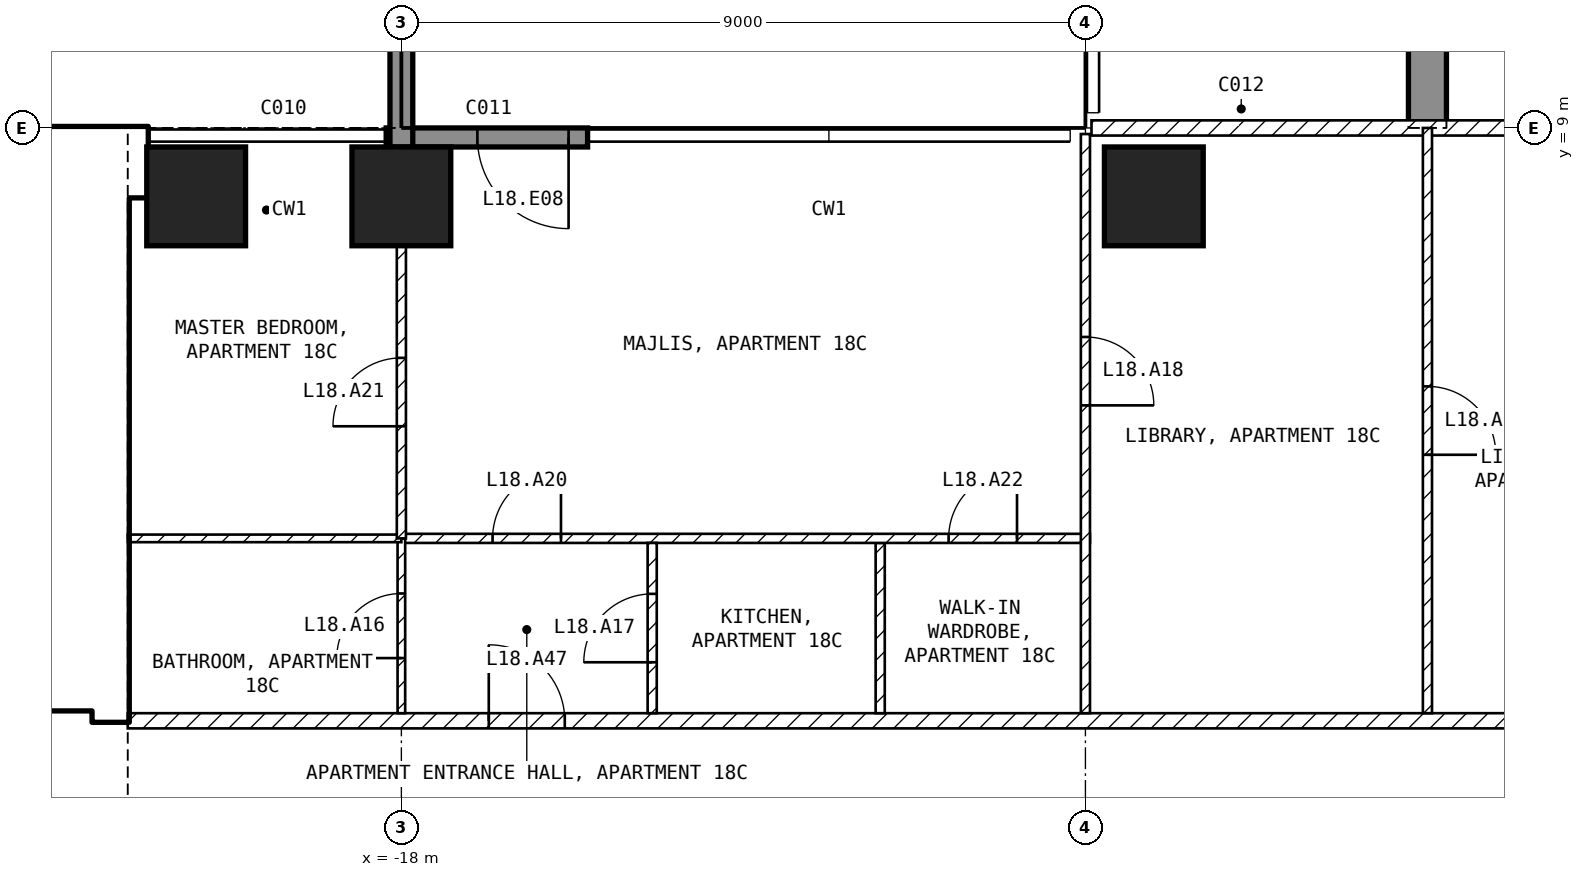
"""IFC4 building model, lengths in metres.
Left out: names, types, materials, properties, quantities, classifications, styles, units other than length and angle.
Written with IfcOpenShell. Run it as: python <this file> out.ifc"""

import sys

from ifc_helpers import new_model, si_unit, direction, frame, frame_2d, origin, origin_2d, place, context, subcontext, project, spatial, polyline, rectangle, outline, extrude, element, fill, save


model = new_model("IFC4")
c1 = context("Model", 3, precision=1e-05, world=origin(), true_north=direction((0.0, 1.0)))
c2 = subcontext(c1, "Body", "Model", "MODEL_VIEW")
j1 = project(units=[si_unit("LENGTHUNIT", "METRE"), si_unit("PLANEANGLEUNIT", "RADIAN")], contexts=[c1])
p1 = place(None, origin())
s1 = spatial("IfcSite", under=j1, at=p1, CompositionType="ELEMENT")
p2 = place(p1, origin())
s2 = spatial("IfcBuilding", under=s1, at=p2, CompositionType="ELEMENT")
p3 = place(p2, frame((0.0, 0.0, 82.0)))
s3 = spatial("IfcBuildingStorey", under=s2, at=p3, CompositionType="ELEMENT", Elevation=82.0)
for number, where, z_axis, x_axis in (
    (1, (-20.7, 8.1, -0.25), (0.0, 0.0, 1.0), (1.0, 0.0, 0.0)),
    (2, (-18.0, 8.1, -0.25), (0.0, 0.0, 1.0), (1.0, 0.0, 0.0)),
    (3, (-8.1, 8.1, -0.25), (0.0, 0.0, 1.0), (1.0, 0.0, 0.0)),
):
    element("IfcColumn", number, at=place(p3, frame(where, z_axis=z_axis, x_axis=x_axis)), inside=s3, PredefinedType="COLUMN", context=c2, shape_type="SweptSolid", body=[
        extrude(rectangle(XDim=1.3, YDim=1.3, at=origin_2d()), origin(), (0.0, 0.0, 1.0), 3.5),
    ])
p4 = place(p3, frame((-4.75, 9.0, -0.25), z_axis=(1.0, 0.0, 0.0), x_axis=(0.0, 1.0, 0.0)))
e4 = element("IfcWall", 4, at=p4, inside=s3, PredefinedType="SHEAR", context=c2, shape_type="SweptSolid", body=[
    extrude(outline(polyline([(0.0, 0.0), (2.1, 0.0), (2.1, 2.65), (4.5, 2.65), (4.5, 0.0), (9.9, 0.0), (9.9, 2.65), (12.3, 2.65), (12.3, 0.0), (16.45, 0.0), (16.45, 3.5), (0.0, 3.5), (0.0, 0.0)])), origin(), (0.0, 0.0, 1.0), 0.5),
])
p5 = place(p3, frame((-15.55, 8.875, 0.0), z_axis=(0.0, 0.0, 1.0), x_axis=(-1.0, 0.0, 0.0)))
e5 = element("IfcWall", 5, at=p5, inside=s3, PredefinedType="SOLIDWALL", context=c2, shape_type="SweptSolid", body=[
    extrude(rectangle(XDim=2.65, YDim=0.25, at=frame_2d((1.325, 0.0))), origin(), (0.0, 0.0, 1.0), 3.25),
])
p6 = place(p5, frame((0.25, 0.0, 0.0)))
e6 = element("IfcOpeningElement", 6, at=p6, cuts=e5, PredefinedType="OPENING", context=c2, shape_type="SweptSolid", body=[
    extrude(rectangle(XDim=1.2, YDim=2.4, at=frame_2d((0.6, 1.2))), frame((0.0, 0.135, 0.0), z_axis=(0.0, -1.0, 0.0), x_axis=(1.0, 0.0, 0.0)), (0.0, 0.0, 1.0), 0.27),
])
p7 = place(p3, frame((-18.0, 8.75, 0.0), z_axis=(0.0, 0.0, 1.0), x_axis=(0.0, 1.0, 0.0)))
e7 = element("IfcWall", 7, at=p7, inside=s3, PredefinedType="SOLIDWALL", context=c2, shape_type="SweptSolid", body=[
    extrude(rectangle(XDim=2.95, YDim=0.3, at=frame_2d((1.475, 0.0))), origin(), (0.0, 0.0, 1.0), 3.25),
])
p8 = place(p3, frame((-31.5, 8.55, 0.0), z_axis=(0.0, 0.0, 1.0), x_axis=(1.0, 0.0, 0.0)))
e8 = element("IfcWall", 8, at=p8, inside=s3, PredefinedType="SHEAR", context=c2, shape_type="SweptSolid", body=[
    extrude(rectangle(XDim=10.15, YDim=0.9, at=frame_2d((5.075, 0.0))), origin(), (0.0, 0.0, 1.0), 3.25),
])
p9 = place(p3, frame((-21.825, 1.2, 0.0), z_axis=(0.0, 0.0, 1.0), x_axis=(0.0, 1.0, 0.0)))
e9 = element("IfcWall", 9, at=p9, inside=s3, PredefinedType="SHEAR", context=c2, shape_type="SweptSolid", body=[
    extrude(rectangle(XDim=6.9, YDim=0.45, at=frame_2d((3.45, 0.0))), origin(), (0.0, 0.0, 1.0), 3.25),
])
p10 = place(p3, frame((-35.1, 1.45, 0.0), z_axis=(0.0, 0.0, 1.0), x_axis=(1.0, 0.0, 0.0)))
e10 = element("IfcWall", 10, at=p10, inside=s3, PredefinedType="SOLIDWALL", context=c2, shape_type="SweptSolid", body=[
    extrude(rectangle(XDim=13.05, YDim=0.2, at=frame_2d((6.525, 0.0))), origin(), (0.0, 0.0, 1.0), 3.25),
])
p11 = place(p10, frame((11.3, 0.0, 0.0)))
e11 = element("IfcOpeningElement", 11, at=p11, cuts=e10, PredefinedType="OPENING", context=c2, shape_type="SweptSolid", body=[
    extrude(rectangle(XDim=1.0, YDim=2.1, at=frame_2d((0.5, 1.05))), frame((0.0, 0.11, 0.0), z_axis=(0.0, -1.0, 0.0), x_axis=(1.0, 0.0, 0.0)), (0.0, 0.0, 1.0), 0.22),
])
p12 = place(p10, frame((8.8, 0.0, 0.0)))
e12 = element("IfcOpeningElement", 12, at=p12, cuts=e10, PredefinedType="OPENING", context=c2, shape_type="SweptSolid", body=[
    extrude(rectangle(XDim=1.0, YDim=2.1, at=frame_2d((0.5, 1.05))), frame((0.0, 0.11, 0.0), z_axis=(0.0, -1.0, 0.0), x_axis=(1.0, 0.0, 0.0)), (0.0, 0.0, 1.0), 0.22),
])
p13 = place(p3, frame((-28.35, 5.15, 0.0), z_axis=(0.0, 0.0, 1.0), x_axis=(1.0, 0.0, 0.0)))
e13 = element("IfcWall", 13, at=p13, inside=s3, PredefinedType="SOLIDWALL", context=c2, shape_type="SweptSolid", body=[
    extrude(rectangle(XDim=6.3, YDim=0.2, at=frame_2d((3.15, 0.0))), origin(), (0.0, 0.0, 1.0), 3.25),
])
p14 = place(p13, frame((5.1, 0.0, 0.0)))
e14 = element("IfcOpeningElement", 14, at=p14, cuts=e13, PredefinedType="OPENING", context=c2, shape_type="SweptSolid", body=[
    extrude(rectangle(XDim=1.0, YDim=2.1, at=frame_2d((0.5, 1.05))), frame((0.0, 0.11, 0.0), z_axis=(0.0, -1.0, 0.0), x_axis=(1.0, 0.0, 0.0)), (0.0, 0.0, 1.0), 0.22),
])
p15 = place(p3, frame((-21.6, 1.2, 0.0), z_axis=(0.0, 0.0, 1.0), x_axis=(1.0, 0.0, 0.0)))
e15 = element("IfcWall", 15, at=p15, inside=s3, PredefinedType="PARTITIONING", context=c2, shape_type="SweptSolid", body=[
    extrude(rectangle(XDim=20.5, YDim=0.2, at=frame_2d((10.25, 0.0))), origin(), (0.0, 0.0, 1.0), 3.25),
])
p16 = place(p15, frame((4.75, 0.0, 0.0)))
e16 = element("IfcOpeningElement", 16, at=p16, cuts=e15, PredefinedType="OPENING", context=c2, shape_type="SweptSolid", body=[
    extrude(rectangle(XDim=1.0, YDim=2.1, at=frame_2d((0.5, 1.05))), frame((0.0, 0.11, 0.0), z_axis=(0.0, -1.0, 0.0), x_axis=(1.0, 0.0, 0.0)), (0.0, 0.0, 1.0), 0.22),
])
p17 = place(p3, frame((-8.92, 9.0, 0.0), z_axis=(0.0, 0.0, 1.0), x_axis=(1.0, 0.0, 0.0)))
e17 = element("IfcWall", 17, at=p17, inside=s3, PredefinedType="PARTITIONING", context=c2, shape_type="SweptSolid", body=[
    extrude(rectangle(XDim=17.84, YDim=0.2, at=frame_2d((8.92, 0.0))), origin(), (0.0, 0.0, 1.0), 3.25),
])
p18 = place(p17, frame((8.42, 0.0, 0.0)))
e18 = element("IfcOpeningElement", 18, at=p18, cuts=e17, PredefinedType="OPENING", context=c2, shape_type="SweptSolid", body=[
    extrude(rectangle(XDim=1.0, YDim=2.1, at=frame_2d((0.5, 1.05))), frame((0.0, 0.11, 0.0), z_axis=(0.0, -1.0, 0.0), x_axis=(1.0, 0.0, 0.0)), (0.0, 0.0, 1.0), 0.22),
])
p19 = place(p3, frame((-11.7, 1.3, 0.0), z_axis=(0.0, 0.0, 1.0), x_axis=(0.0, 1.0, 0.0)))
e19 = element("IfcWall", 19, at=p19, inside=s3, PredefinedType="PARTITIONING", context=c2, shape_type="SweptSolid", body=[
    extrude(rectangle(XDim=2.24, YDim=0.12, at=frame_2d((1.12, 0.0))), origin(), (0.0, 0.0, 1.0), 3.25),
])
p20 = place(p3, frame((-18.0, 3.6, 0.0), z_axis=(0.0, 0.0, 1.0), x_axis=(1.0, 0.0, 0.0)))
e20 = element("IfcWall", 20, at=p20, inside=s3, PredefinedType="PARTITIONING", context=c2, shape_type="SweptSolid", body=[
    extrude(rectangle(XDim=9.06, YDim=0.12, at=frame_2d((4.53, 0.0))), origin(), (0.0, 0.0, 1.0), 3.25),
])
p21 = place(p20, frame((1.2, 0.0, 0.0)))
e21 = element("IfcOpeningElement", 21, at=p21, cuts=e20, PredefinedType="OPENING", context=c2, shape_type="SweptSolid", body=[
    extrude(rectangle(XDim=0.9, YDim=2.1, at=frame_2d((0.45, 1.05))), frame((0.0, 0.07, 0.0), z_axis=(0.0, -1.0, 0.0), x_axis=(1.0, 0.0, 0.0)), (0.0, 0.0, 1.0), 0.14),
])
p22 = place(p20, frame((7.2, 0.0, 0.0)))
e22 = element("IfcOpeningElement", 22, at=p22, cuts=e20, PredefinedType="OPENING", context=c2, shape_type="SweptSolid", body=[
    extrude(rectangle(XDim=0.9, YDim=2.1, at=frame_2d((0.45, 1.05))), frame((0.0, 0.07, 0.0), z_axis=(0.0, -1.0, 0.0), x_axis=(1.0, 0.0, 0.0)), (0.0, 0.0, 1.0), 0.14),
])
p23 = place(p3, frame((-9.0, 8.92, 0.0), z_axis=(0.0, 0.0, 1.0), x_axis=(0.0, -1.0, 0.0)))
e23 = element("IfcWall", 23, at=p23, inside=s3, PredefinedType="PARTITIONING", context=c2, shape_type="SweptSolid", body=[
    extrude(rectangle(XDim=7.62, YDim=0.12, at=frame_2d((3.81, 0.0))), origin(), (0.0, 0.0, 1.0), 3.25),
])
p24 = place(p23, frame((2.67, 0.0, 0.0)))
e24 = element("IfcOpeningElement", 24, at=p24, cuts=e23, PredefinedType="OPENING", context=c2, shape_type="SweptSolid", body=[
    extrude(rectangle(XDim=0.9, YDim=2.1, at=frame_2d((0.45, 1.05))), frame((0.0, 0.07, 0.0), z_axis=(0.0, -1.0, 0.0), x_axis=(1.0, 0.0, 0.0)), (0.0, 0.0, 1.0), 0.14),
])
p25 = place(p3, frame((-14.7, 1.3, 0.0), z_axis=(0.0, 0.0, 1.0), x_axis=(0.0, 1.0, 0.0)))
e25 = element("IfcWall", 25, at=p25, inside=s3, PredefinedType="PARTITIONING", context=c2, shape_type="SweptSolid", body=[
    extrude(rectangle(XDim=2.24, YDim=0.12, at=frame_2d((1.12, 0.0))), origin(), (0.0, 0.0, 1.0), 3.25),
])
p26 = place(p25, frame((0.67, 0.0, 0.0)))
e26 = element("IfcOpeningElement", 26, at=p26, cuts=e25, PredefinedType="OPENING", context=c2, shape_type="SweptSolid", body=[
    extrude(rectangle(XDim=0.9, YDim=2.1, at=frame_2d((0.45, 1.05))), frame((0.0, 0.07, 0.0), z_axis=(0.0, -1.0, 0.0), x_axis=(1.0, 0.0, 0.0)), (0.0, 0.0, 1.0), 0.14),
])
p27 = place(p3, frame((-18.0, 1.3, 0.0), z_axis=(0.0, 0.0, 1.0), x_axis=(0.0, 1.0, 0.0)))
e27 = element("IfcWall", 27, at=p27, inside=s3, PredefinedType="PARTITIONING", context=c2, shape_type="SweptSolid", body=[
    extrude(rectangle(XDim=2.3, YDim=0.1, at=frame_2d((1.15, 0.0))), origin(), (0.0, 0.0, 1.0), 2.346),
])
p28 = place(p27, frame((0.725, 0.0, 0.0)))
e28 = element("IfcOpeningElement", 28, at=p28, cuts=e27, PredefinedType="OPENING", context=c2, shape_type="SweptSolid", body=[
    extrude(rectangle(XDim=0.85, YDim=2.1, at=frame_2d((0.425, 1.05))), frame((0.0, 0.06, 0.0), z_axis=(0.0, -1.0, 0.0), x_axis=(1.0, 0.0, 0.0)), (0.0, 0.0, 1.0), 0.12),
])
p29 = place(p3, frame((-21.6, 3.6, 0.0), z_axis=(0.0, 0.0, 1.0), x_axis=(1.0, 0.0, 0.0)))
e29 = element("IfcWall", 29, at=p29, inside=s3, PredefinedType="PARTITIONING", context=c2, shape_type="SweptSolid", body=[
    extrude(rectangle(XDim=3.6, YDim=0.1, at=frame_2d((1.8, 0.0))), origin(), (0.0, 0.0, 1.0), 3.25),
])
p30 = place(p3, frame((-18.0, 3.6, 0.0), z_axis=(0.0, 0.0, 1.0), x_axis=(0.0, 1.0, 0.0)))
e30 = element("IfcWall", 30, at=p30, inside=s3, PredefinedType="PARTITIONING", context=c2, shape_type="SweptSolid", body=[
    extrude(rectangle(XDim=3.85, YDim=0.12, at=frame_2d((1.925, 0.0))), origin(), (0.0, 0.0, 1.0), 2.346),
])
p31 = place(p30, frame((1.475, 0.0, 0.0)))
e31 = element("IfcOpeningElement", 31, at=p31, cuts=e30, PredefinedType="OPENING", context=c2, shape_type="SweptSolid", body=[
    extrude(rectangle(XDim=0.9, YDim=2.1, at=frame_2d((0.45, 1.05))), frame((0.0, 0.07, 0.0), z_axis=(0.0, -1.0, 0.0), x_axis=(1.0, 0.0, 0.0)), (0.0, 0.0, 1.0), 0.14),
])
p32 = place(p3, frame((-4.5, 9.0, 0.0), z_axis=(0.0, 0.0, 1.0), x_axis=(0.0, -1.0, 0.0)))
e32 = element("IfcWall", 32, at=p32, inside=s3, PredefinedType="PARTITIONING", context=c2, shape_type="SweptSolid", body=[
    extrude(rectangle(XDim=7.7, YDim=0.12, at=frame_2d((3.85, 0.0))), origin(), (0.0, 0.0, 1.0), 3.25),
])
p33 = place(p32, frame((3.4, 0.0, 0.0)))
e33 = element("IfcOpeningElement", 33, at=p33, cuts=e32, PredefinedType="OPENING", context=c2, shape_type="SweptSolid", body=[
    extrude(rectangle(XDim=0.9, YDim=2.1, at=frame_2d((0.45, 1.05))), frame((0.0, 0.07, 0.0), z_axis=(0.0, -1.0, 0.0), x_axis=(1.0, 0.0, 0.0)), (0.0, 0.0, 1.0), 0.14),
])
p34 = place(p6, origin())
e34 = element("IfcDoor", 34, at=p34, inside=s3, OperationType="SINGLE_SWING_LEFT", PredefinedType="DOOR", context=c2, shape_type="SweptSolid", body=[
    extrude(rectangle(XDim=1.2, YDim=2.4, at=frame_2d((0.6, 1.2))), frame((0.0, 0.025, 0.0), z_axis=(0.0, -1.0, 0.0), x_axis=(1.0, 0.0, 0.0)), (0.0, 0.0, 1.0), 0.05),
])
fill(e6, e34)
p35 = place(p14, origin())
e35 = element("IfcDoor", 35, at=p35, inside=s3, OperationType="SINGLE_SWING_LEFT", PredefinedType="DOOR", context=c2, shape_type="SweptSolid", body=[
    extrude(rectangle(XDim=1.0, YDim=2.1, at=frame_2d((0.5, 1.05))), frame((0.0, 0.025, 0.0), z_axis=(0.0, -1.0, 0.0), x_axis=(1.0, 0.0, 0.0)), (0.0, 0.0, 1.0), 0.05),
])
fill(e14, e35)
p36 = place(p28, origin())
e36 = element("IfcDoor", 36, at=p36, inside=s3, OperationType="SINGLE_SWING_LEFT", PredefinedType="DOOR", context=c2, shape_type="SweptSolid", body=[
    extrude(rectangle(XDim=0.85, YDim=2.1, at=frame_2d((0.425, 1.05))), frame((0.0, 0.025, 0.0), z_axis=(0.0, -1.0, 0.0), x_axis=(1.0, 0.0, 0.0)), (0.0, 0.0, 1.0), 0.05),
])
fill(e28, e36)
p37 = place(p26, origin())
e37 = element("IfcDoor", 37, at=p37, inside=s3, OperationType="SINGLE_SWING_LEFT", PredefinedType="DOOR", context=c2, shape_type="SweptSolid", body=[
    extrude(rectangle(XDim=0.9, YDim=2.1, at=frame_2d((0.45, 1.05))), frame((0.0, 0.025, 0.0), z_axis=(0.0, -1.0, 0.0), x_axis=(1.0, 0.0, 0.0)), (0.0, 0.0, 1.0), 0.05),
])
fill(e26, e37)
p38 = place(p24, origin())
e38 = element("IfcDoor", 38, at=p38, inside=s3, OperationType="SINGLE_SWING_RIGHT", PredefinedType="DOOR", context=c2, shape_type="SweptSolid", body=[
    extrude(rectangle(XDim=0.9, YDim=2.1, at=frame_2d((0.45, 1.05))), frame((0.0, 0.025, 0.0), z_axis=(0.0, -1.0, 0.0), x_axis=(1.0, 0.0, 0.0)), (0.0, 0.0, 1.0), 0.05),
])
fill(e24, e38)
p39 = place(p33, origin())
e39 = element("IfcDoor", 39, at=p39, inside=s3, OperationType="SINGLE_SWING_RIGHT", PredefinedType="DOOR", context=c2, shape_type="SweptSolid", body=[
    extrude(rectangle(XDim=0.9, YDim=2.1, at=frame_2d((0.45, 1.05))), frame((0.0, 0.025, 0.0), z_axis=(0.0, -1.0, 0.0), x_axis=(1.0, 0.0, 0.0)), (0.0, 0.0, 1.0), 0.05),
])
fill(e33, e39)
p40 = place(p21, origin())
e40 = element("IfcDoor", 40, at=p40, inside=s3, OperationType="SINGLE_SWING_RIGHT", PredefinedType="DOOR", context=c2, shape_type="SweptSolid", body=[
    extrude(rectangle(XDim=0.9, YDim=2.1, at=frame_2d((0.45, 1.05))), frame((0.0, 0.025, 0.0), z_axis=(0.0, -1.0, 0.0), x_axis=(1.0, 0.0, 0.0)), (0.0, 0.0, 1.0), 0.05),
])
fill(e21, e40)
p41 = place(p31, origin())
e41 = element("IfcDoor", 41, at=p41, inside=s3, OperationType="SINGLE_SWING_LEFT", PredefinedType="DOOR", context=c2, shape_type="SweptSolid", body=[
    extrude(rectangle(XDim=0.9, YDim=2.1, at=frame_2d((0.45, 1.05))), frame((0.0, 0.025, 0.0), z_axis=(0.0, -1.0, 0.0), x_axis=(1.0, 0.0, 0.0)), (0.0, 0.0, 1.0), 0.05),
])
fill(e31, e41)
p42 = place(p22, origin())
e42 = element("IfcDoor", 42, at=p42, inside=s3, OperationType="SINGLE_SWING_RIGHT", PredefinedType="DOOR", context=c2, shape_type="SweptSolid", body=[
    extrude(rectangle(XDim=0.9, YDim=2.1, at=frame_2d((0.45, 1.05))), frame((0.0, 0.025, 0.0), z_axis=(0.0, -1.0, 0.0), x_axis=(1.0, 0.0, 0.0)), (0.0, 0.0, 1.0), 0.05),
])
fill(e22, e42)
p43 = place(p16, origin())
e43 = element("IfcDoor", 43, at=p43, inside=s3, OperationType="SINGLE_SWING_LEFT", PredefinedType="DOOR", context=c2, shape_type="SweptSolid", body=[
    extrude(rectangle(XDim=1.0, YDim=2.1, at=frame_2d((0.5, 1.05))), frame((0.0, 0.025, 0.0), z_axis=(0.0, -1.0, 0.0), x_axis=(1.0, 0.0, 0.0)), (0.0, 0.0, 1.0), 0.05),
])
fill(e16, e43)
save(model, sys.argv[1])
